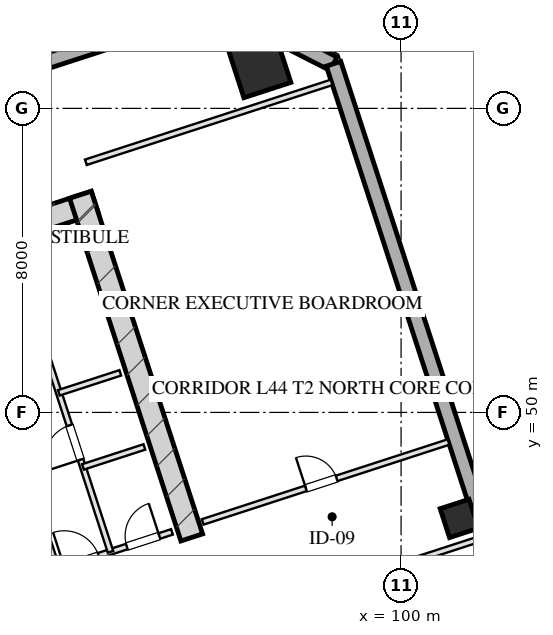
"""IFC4 building model, lengths in metres.
Left out: names, types, materials, properties, quantities, classifications, styles, units other than length and angle.
Written with IfcOpenShell. Run it as: python <this file> out.ifc"""

import sys

from ifc_helpers import new_model, si_unit, direction, frame, frame_2d, origin, origin_2d, place, context, subcontext, project, spatial, rectangle, hollow_rectangle, extrude, element, fill, save


model = new_model("IFC4")
c1 = context("Model", 3, precision=1e-05, world=origin(), true_north=direction((0.0, 1.0)))
c2 = subcontext(c1, "Body", "Model", "MODEL_VIEW")
j1 = project(units=[si_unit("LENGTHUNIT", "METRE"), si_unit("PLANEANGLEUNIT", "RADIAN")], contexts=[c1])
p1 = place(None, origin())
s1 = spatial("IfcSite", under=j1, at=p1, CompositionType="ELEMENT")
p2 = place(p1, origin())
s2 = spatial("IfcBuilding", under=s1, at=p2, CompositionType="ELEMENT")
p3 = place(p2, frame((0.0, 0.0, 166.75)))
s3 = spatial("IfcBuildingStorey", under=s2, at=p3, CompositionType="ELEMENT", Elevation=166.75)
p4 = place(p3, frame((76.344, 50.466, 0.0), z_axis=(0.0, 0.0, 1.0), x_axis=(0.951055727519, 0.309019421968, 0.0)))
e1 = element("IfcWall", 1, at=p4, inside=s3, PredefinedType="SHEAR", context=c2, shape_type="SweptSolid", body=[
    extrude(rectangle(XDim=16.4, YDim=0.6, at=frame_2d((8.2, 0.0))), origin(), (0.0, 0.0, 1.0), 3.45),
])
p5 = place(p3, frame((94.492, 46.71, 0.0), z_axis=(0.0, 0.0, 1.0), x_axis=(-0.309010370028, 0.95105866865, 0.0)))
e2 = element("IfcWall", 2, at=p5, inside=s3, PredefinedType="SHEAR", context=c2, shape_type="SweptSolid", body=[
    extrude(rectangle(XDim=9.48, YDim=0.6, at=frame_2d((4.74, 0.0))), origin(), (0.0, 0.0, 1.0), 3.45),
])
p6 = place(p3, frame((96.281, 59.099, 0.0), z_axis=(0.0, 0.0, 1.0), x_axis=(0.951056516295, 0.309016994375, 0.0)))
e3 = element("IfcColumn", 3, at=p6, inside=s3, PredefinedType="COLUMN", context=c2, shape_type="SweptSolid", body=[
    extrude(hollow_rectangle(XDim=1.3, YDim=1.3, WallThickness=0.045, at=origin_2d()), origin(), (0.0, 0.0, 1.0), 3.451),
])
p7 = place(p3, frame((101.532, 47.21, 0.0), z_axis=(0.0, 0.0, 1.0), x_axis=(0.951056516295, 0.309016994375, 0.0)))
e4 = element("IfcColumn", 4, at=p7, inside=s3, PredefinedType="COLUMN", context=c2, shape_type="SweptSolid", body=[
    extrude(hollow_rectangle(XDim=0.8, YDim=0.8, WallThickness=0.028, at=origin_2d()), origin(), (0.0, 0.0, 1.0), 3.451),
])
p8 = place(p3, frame((70.092, 52.556, 0.0), z_axis=(0.0, 0.0, 1.0), x_axis=(0.951057580055, 0.30901372044, 0.0)))
e5 = element("IfcWall", 5, at=p8, inside=s3, PredefinedType="SOLIDWALL", context=c2, shape_type="SweptSolid", body=[
    extrude(rectangle(XDim=26.4, YDim=0.4, at=frame_2d((13.2, 0.0))), origin(), (0.0, 0.0, 1.0), 2.61),
])
p9 = place(p3, frame((95.199, 60.714, 0.0), z_axis=(0.0, 0.0, 1.0), x_axis=(0.891020832027, -0.453962417932, 0.0)))
e6 = element("IfcWall", 6, at=p9, inside=s3, PredefinedType="SOLIDWALL", context=c2, shape_type="SweptSolid", body=[
    extrude(rectangle(XDim=3.394, YDim=0.4, at=frame_2d((1.697, 0.0))), origin(), (0.0, 0.0, 1.0), 2.61),
])
p10 = place(p3, frame((98.224, 59.173, 0.0), z_axis=(0.0, 0.0, 1.0), x_axis=(0.309014228706, -0.951057414911, 0.0)))
e7 = element("IfcWall", 7, at=p10, inside=s3, PredefinedType="SOLIDWALL", context=c2, shape_type="SweptSolid", body=[
    extrude(rectangle(XDim=42.8, YDim=0.4, at=frame_2d((21.4, 0.0))), origin(), (0.0, 0.0, 1.0), 2.61),
])
p11 = place(p10, frame((17.675, 0.0, 0.75)))
e8 = element("IfcOpeningElement", 8, at=p11, cuts=e7, PredefinedType="OPENING", context=c2, shape_type="SweptSolid", body=[
    extrude(rectangle(XDim=2.25, YDim=1.46, at=frame_2d((1.125, 0.73))), frame((0.0, 0.21, 0.0), z_axis=(0.0, -1.0, 0.0), x_axis=(1.0, 0.0, 0.0)), (0.0, 0.0, 1.0), 0.42),
])
p12 = place(p10, frame((13.875, 0.0, 0.75)))
e9 = element("IfcOpeningElement", 9, at=p12, cuts=e7, PredefinedType="OPENING", context=c2, shape_type="SweptSolid", body=[
    extrude(rectangle(XDim=2.25, YDim=1.46, at=frame_2d((1.125, 0.73))), frame((0.0, 0.21, 0.0), z_axis=(0.0, -1.0, 0.0), x_axis=(1.0, 0.0, 0.0)), (0.0, 0.0, 1.0), 0.42),
])
p13 = place(p10, frame((26.784, 0.0, 0.0)))
e10 = element("IfcOpeningElement", 10, at=p13, cuts=e7, PredefinedType="OPENING", context=c2, shape_type="SweptSolid", body=[
    extrude(rectangle(XDim=1.1, YDim=2.15, at=frame_2d((0.55, 1.075))), frame((0.0, 0.21, 0.0), z_axis=(0.0, -1.0, 0.0), x_axis=(1.0, 0.0, 0.0)), (0.0, 0.0, 1.0), 0.42),
])
p14 = place(p3, frame((90.928, 45.868, 0.0), z_axis=(0.0, 0.0, 1.0), x_axis=(-0.309042196757, 0.951048327176, 0.0)))
e11 = element("IfcWall", 11, at=p14, inside=s3, PredefinedType="PARTITIONING", context=c2, shape_type="SweptSolid", body=[
    extrude(rectangle(XDim=8.43, YDim=0.2, at=frame_2d((4.215, 0.0))), origin(), (0.0, 0.0, 1.0), 3.175),
])
p15 = place(p3, frame((90.928, 45.868, 0.0), z_axis=(0.0, 0.0, 1.0), x_axis=(0.951059297078, 0.309008435874, 0.0)))
e12 = element("IfcWall", 12, at=p15, inside=s3, PredefinedType="PARTITIONING", context=c2, shape_type="SweptSolid", body=[
    extrude(rectangle(XDim=3.2, YDim=0.15, at=frame_2d((1.6, 0.0))), origin(), (0.0, 0.0, 1.0), 3.175),
])
p16 = place(p15, frame((0.22, 0.0, 0.0)))
e13 = element("IfcOpeningElement", 13, at=p16, cuts=e12, PredefinedType="OPENING", context=c2, shape_type="SweptSolid", body=[
    extrude(rectangle(XDim=0.95, YDim=2.05, at=frame_2d((0.475, 1.025))), frame((0.0, 0.085, 0.0), z_axis=(0.0, -1.0, 0.0), x_axis=(1.0, 0.0, 0.0)), (0.0, 0.0, 1.0), 0.17),
])
p17 = place(p15, frame((1.95, 0.0, 0.0)))
e14 = element("IfcOpeningElement", 14, at=p17, cuts=e12, PredefinedType="OPENING", context=c2, shape_type="SweptSolid", body=[
    extrude(rectangle(XDim=0.9, YDim=2.05, at=frame_2d((0.45, 1.025))), frame((0.0, 0.085, 0.0), z_axis=(0.0, -1.0, 0.0), x_axis=(1.0, 0.0, 0.0)), (0.0, 0.0, 1.0), 0.17),
])
p18 = place(p3, frame((92.355, 46.331, 0.0), z_axis=(0.0, 0.0, 1.0), x_axis=(-0.309007490203, 0.951059604335, 0.0)))
e15 = element("IfcWall", 15, at=p18, inside=s3, PredefinedType="PARTITIONING", context=c2, shape_type="SweptSolid", body=[
    extrude(rectangle(XDim=8.43, YDim=0.15, at=frame_2d((4.215, 0.0))), origin(), (0.0, 0.0, 1.0), 3.175),
])
p19 = place(p18, frame((2.55, 0.0, 0.0)))
e16 = element("IfcOpeningElement", 16, at=p19, cuts=e15, PredefinedType="OPENING", context=c2, shape_type="SweptSolid", body=[
    extrude(rectangle(XDim=0.95, YDim=2.05, at=frame_2d((0.475, 1.025))), frame((0.0, 0.085, 0.0), z_axis=(0.0, -1.0, 0.0), x_axis=(1.0, 0.0, 0.0)), (0.0, 0.0, 1.0), 0.17),
])
p20 = place(p18, frame((5.6, 0.0, 0.0)))
e17 = element("IfcOpeningElement", 17, at=p20, cuts=e15, PredefinedType="OPENING", context=c2, shape_type="SweptSolid", body=[
    extrude(rectangle(XDim=0.9, YDim=2.05, at=frame_2d((0.45, 1.025))), frame((0.0, 0.085, 0.0), z_axis=(0.0, -1.0, 0.0), x_axis=(1.0, 0.0, 0.0)), (0.0, 0.0, 1.0), 0.17),
])
p21 = place(p3, frame((90.995, 50.516, 0.0), z_axis=(0.0, 0.0, 1.0), x_axis=(0.951040401051, 0.309066587596, 0.0)))
e18 = element("IfcWall", 18, at=p21, inside=s3, PredefinedType="PARTITIONING", context=c2, shape_type="SweptSolid", body=[
    extrude(rectangle(XDim=1.7, YDim=0.15, at=frame_2d((0.85, 0.0))), origin(), (0.0, 0.0, 1.0), 3.175),
])
p22 = place(p3, frame((91.628, 48.566, 0.0), z_axis=(0.0, 0.0, 1.0), x_axis=(0.951054116971, 0.309024378638, 0.0)))
e19 = element("IfcWall", 19, at=p22, inside=s3, PredefinedType="PARTITIONING", context=c2, shape_type="SweptSolid", body=[
    extrude(rectangle(XDim=1.7, YDim=0.15, at=frame_2d((0.85, 0.0))), origin(), (0.0, 0.0, 1.0), 3.175),
])
p23 = place(p3, frame((91.705, 56.582, 0.0), z_axis=(0.0, 0.0, 1.0), x_axis=(0.951057811516, 0.309013008068, 0.0)))
e20 = element("IfcWall", 20, at=p23, inside=s3, PredefinedType="PARTITIONING", context=c2, shape_type="SweptSolid", body=[
    extrude(rectangle(XDim=6.8, YDim=0.15, at=frame_2d((3.4, 0.0))), origin(), (0.0, 0.0, 1.0), 3.175),
])
p24 = place(p3, frame((94.78, 47.119, 0.0), z_axis=(0.0, 0.0, 1.0), x_axis=(0.951057811516, 0.309013008068, 0.0)))
e21 = element("IfcWall", 21, at=p24, inside=s3, PredefinedType="PARTITIONING", context=c2, shape_type="SweptSolid", body=[
    extrude(rectangle(XDim=6.8, YDim=0.15, at=frame_2d((3.4, 0.0))), origin(), (0.0, 0.0, 1.0), 3.175),
])
p25 = place(p24, frame((2.856, 0.0, 0.0)))
e22 = element("IfcOpeningElement", 22, at=p25, cuts=e21, PredefinedType="OPENING", context=c2, shape_type="SweptSolid", body=[
    extrude(rectangle(XDim=0.85, YDim=2.05, at=frame_2d((0.425, 1.025))), frame((0.0, 0.085, 0.0), z_axis=(0.0, -1.0, 0.0), x_axis=(1.0, 0.0, 0.0)), (0.0, 0.0, 1.0), 0.17),
])
p26 = place(p3, frame((91.138, 43.118, 0.0), z_axis=(0.0, 0.0, 1.0), x_axis=(0.951054972381, 0.309021746015, 0.0)))
e23 = element("IfcWall", 23, at=p26, inside=s3, PredefinedType="PARTITIONING", context=c2, shape_type="SweptSolid", body=[
    extrude(rectangle(XDim=11.5, YDim=0.15, at=frame_2d((5.75, 0.0))), origin(), (0.0, 0.0, 1.0), 3.175),
])
p27 = place(p16, origin())
e24 = element("IfcDoor", 24, at=p27, inside=s3, OperationType="SINGLE_SWING_LEFT", PredefinedType="DOOR", context=c2, shape_type="SweptSolid", body=[
    extrude(rectangle(XDim=0.95, YDim=2.05, at=frame_2d((0.475, 1.025))), frame((0.0, 0.025, 0.0), z_axis=(0.0, -1.0, 0.0), x_axis=(1.0, 0.0, 0.0)), (0.0, 0.0, 1.0), 0.05),
])
fill(e13, e24)
p28 = place(p17, origin())
e25 = element("IfcDoor", 25, at=p28, inside=s3, OperationType="SINGLE_SWING_RIGHT", PredefinedType="DOOR", context=c2, shape_type="SweptSolid", body=[
    extrude(rectangle(XDim=0.9, YDim=2.05, at=frame_2d((0.45, 1.025))), frame((0.0, 0.025, 0.0), z_axis=(0.0, -1.0, 0.0), x_axis=(1.0, 0.0, 0.0)), (0.0, 0.0, 1.0), 0.05),
])
fill(e14, e25)
p29 = place(p19, origin())
e26 = element("IfcDoor", 26, at=p29, inside=s3, OperationType="SINGLE_SWING_LEFT", PredefinedType="DOOR", context=c2, shape_type="SweptSolid", body=[
    extrude(rectangle(XDim=0.95, YDim=2.05, at=frame_2d((0.475, 1.025))), frame((0.0, 0.025, 0.0), z_axis=(0.0, -1.0, 0.0), x_axis=(1.0, 0.0, 0.0)), (0.0, 0.0, 1.0), 0.05),
])
fill(e16, e26)
p30 = place(p25, origin())
e27 = element("IfcDoor", 27, at=p30, inside=s3, OperationType="SINGLE_SWING_LEFT", PredefinedType="DOOR", context=c2, shape_type="SweptSolid", body=[
    extrude(rectangle(XDim=0.85, YDim=2.05, at=frame_2d((0.425, 1.025))), frame((0.0, 0.025, 0.0), z_axis=(0.0, -1.0, 0.0), x_axis=(1.0, 0.0, 0.0)), (0.0, 0.0, 1.0), 0.05),
])
fill(e22, e27)
save(model, sys.argv[1])
